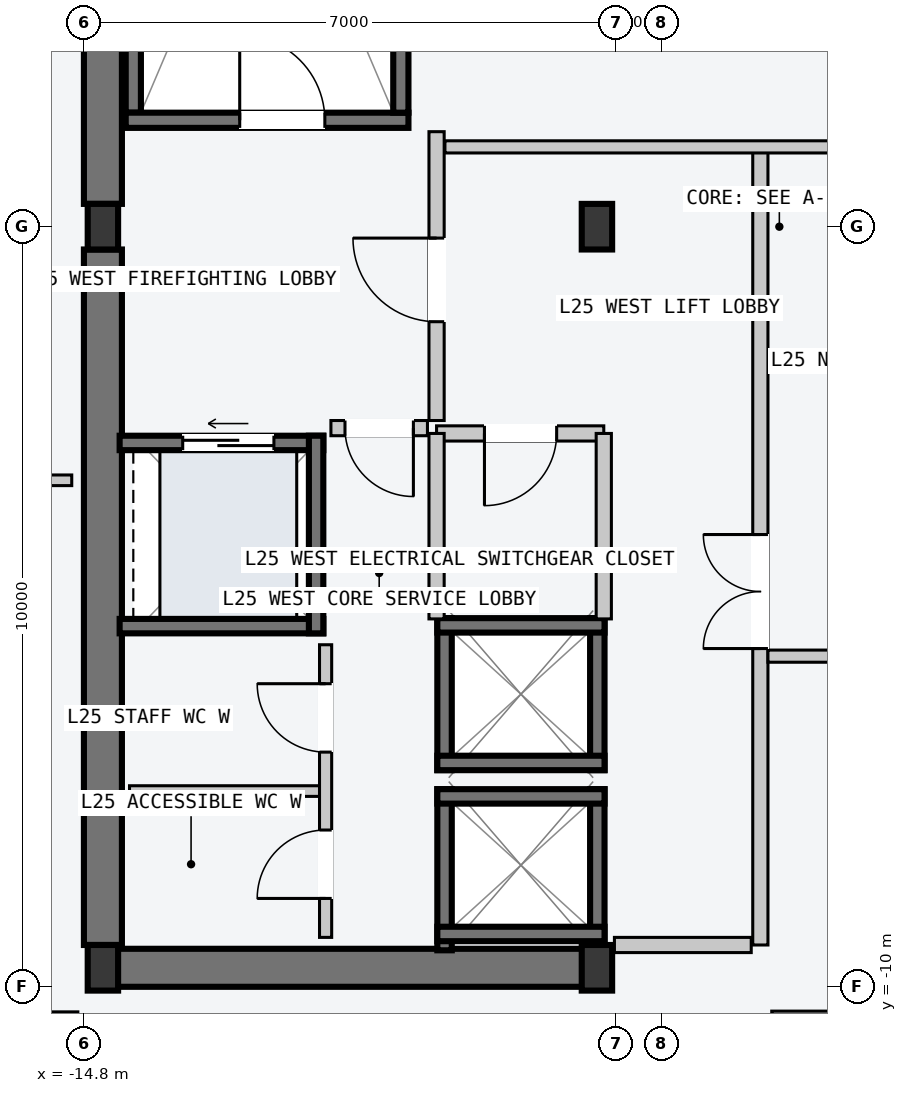
"""IFC4 building model, lengths in metres.
Left out: names, types, materials, properties, quantities, classifications, styles, units other than length and angle.
Written with IfcOpenShell. Run it as: python <this file> out.ifc"""

import sys

from ifc_helpers import new_model, si_unit, direction, frame, frame_2d, origin, origin_2d, place, context, subcontext, project, spatial, rectangle, i_section, extrude, element, fill, save


model = new_model("IFC4")
c1 = context("Model", 3, precision=1e-05, world=origin(), true_north=direction((0.0, 1.0)))
c2 = subcontext(c1, "Body", "Model", "MODEL_VIEW")
j1 = project(units=[si_unit("LENGTHUNIT", "METRE"), si_unit("PLANEANGLEUNIT", "RADIAN")], contexts=[c1])
p1 = place(None, origin())
s1 = spatial("IfcSite", under=j1, at=p1, CompositionType="ELEMENT")
p2 = place(p1, origin())
s2 = spatial("IfcBuilding", under=s1, at=p2, CompositionType="ELEMENT")
p3 = place(p2, frame((0.0, 0.0, 99.0)))
s3 = spatial("IfcBuildingStorey", under=s2, at=p3, CompositionType="ELEMENT", Elevation=99.0)
p4 = place(p3, frame((-14.53, -9.75, -0.2), z_axis=(0.0, 0.0, 1.0), x_axis=(1.0, 0.0, 0.0)))
e1 = element("IfcWall", 1, at=p4, inside=s3, PredefinedType="SHEAR", context=c2, shape_type="SweptSolid", body=[
    extrude(rectangle(XDim=6.46, YDim=0.5, at=frame_2d((3.23, 0.0))), origin(), (0.0, 0.0, 1.0), 3.6),
])
for number, where, z_axis, x_axis in (
    (2, (-14.55, -9.45, -0.2), (0.0, 0.0, 1.0), (0.0, 1.0, 0.0)),
    (3, (-14.55, 0.3, -0.2), (0.0, 0.0, 1.0), (0.0, 1.0, 0.0)),
):
    element("IfcWall", number, at=place(p3, frame(where, z_axis=z_axis, x_axis=x_axis)), inside=s3, PredefinedType="SHEAR", context=c2, shape_type="SweptSolid", body=[
        extrude(rectangle(XDim=9.15, YDim=0.5, at=frame_2d((4.575, 0.0))), origin(), (0.0, 0.0, 1.0), 3.6),
    ])
p5 = place(p3, frame((-14.15, 1.5, -0.2), z_axis=(0.0, 0.0, 1.0), x_axis=(0.0, 1.0, 0.0)))
e4 = element("IfcWall", 4, at=p5, inside=s3, PredefinedType="SOLIDWALL", context=c2, shape_type="SweptSolid", body=[
    extrude(rectangle(XDim=7.8, YDim=0.2, at=frame_2d((3.9, 0.0))), origin(), (0.0, 0.0, 1.0), 3.6),
])
p6 = place(p3, frame((-14.25, 1.4, -0.2), z_axis=(0.0, 0.0, 1.0), x_axis=(1.0, 0.0, 0.0)))
e5 = element("IfcWall", 5, at=p6, inside=s3, PredefinedType="SOLIDWALL", context=c2, shape_type="SweptSolid", body=[
    extrude(rectangle(XDim=3.72, YDim=0.2, at=frame_2d((1.86, 0.0))), origin(), (0.0, 0.0, 1.0), 3.6),
])
p7 = place(p6, frame((1.5, 0.0, 0.2)))
e6 = element("IfcOpeningElement", 6, at=p7, cuts=e5, PredefinedType="OPENING", context=c2, shape_type="SweptSolid", body=[
    extrude(rectangle(XDim=1.12, YDim=2.18, at=frame_2d((0.56, 1.09))), frame((0.0, 0.11, 0.0), z_axis=(0.0, -1.0, 0.0), x_axis=(1.0, 0.0, 0.0)), (0.0, 0.0, 1.0), 0.22),
])
p8 = place(p3, frame((-10.63, 1.5, -0.2), z_axis=(0.0, 0.0, 1.0), x_axis=(0.0, 1.0, 0.0)))
e7 = element("IfcWall", 7, at=p8, inside=s3, PredefinedType="SOLIDWALL", context=c2, shape_type="SweptSolid", body=[
    extrude(rectangle(XDim=7.8, YDim=0.2, at=frame_2d((3.9, 0.0))), origin(), (0.0, 0.0, 1.0), 3.6),
])
for number, where, z_axis, x_axis in (
    (8, (-14.55, -9.75, 0.0), (0.0, 0.0, 1.0), (1.0, 0.0, 0.0)),
    (9, (-14.55, 0.0, 0.0), (0.0, 0.0, 1.0), (1.0, 0.0, 0.0)),
    (10, (-8.05, -9.75, 0.0), (0.0, 0.0, 1.0), (1.0, 0.0, 0.0)),
    (11, (-8.05, 0.0, 0.0), (0.0, 0.0, 1.0), (1.0, 0.0, 0.0)),
):
    element("IfcColumn", number, at=place(p3, frame(where, z_axis=z_axis, x_axis=x_axis)), inside=s3, PredefinedType="COLUMN", context=c2, shape_type="SweptSolid", body=[
        extrude(i_section(OverallWidth=0.4, OverallDepth=0.6, WebThickness=0.022, FlangeThickness=0.036, at=origin_2d()), origin(), (0.0, 0.0, 1.0), 3.6),
    ])
for number, where, z_axis, x_axis in (
    (12, (-8.045, -9.52, -0.2), (0.0, 0.0, 1.0), (0.0, 1.0, 0.0)),
    (13, (-10.055, -9.52, -0.2), (0.0, 0.0, 1.0), (0.0, 1.0, 0.0)),
):
    element("IfcWall", number, at=place(p3, frame(where, z_axis=z_axis, x_axis=x_axis)), inside=s3, PredefinedType="SOLIDWALL", context=c2, shape_type="SweptSolid", body=[
        extrude(rectangle(XDim=2.12, YDim=0.19, at=frame_2d((1.06, 0.0))), origin(), (0.0, 0.0, 1.0), 3.6),
    ])
for number, where, z_axis, x_axis in (
    (14, (-10.15, -7.495, -0.2), (0.0, 0.0, 1.0), (1.0, 0.0, 0.0)),
    (15, (-10.15, -9.305, -0.2), (0.0, 0.0, 1.0), (1.0, 0.0, 0.0)),
):
    element("IfcWall", number, at=place(p3, frame(where, z_axis=z_axis, x_axis=x_axis)), inside=s3, PredefinedType="SOLIDWALL", context=c2, shape_type="SweptSolid", body=[
        extrude(rectangle(XDim=2.2, YDim=0.19, at=frame_2d((1.1, 0.0))), origin(), (0.0, 0.0, 1.0), 3.6),
    ])
for number, where, z_axis, x_axis in (
    (16, (-8.045, -7.15, -0.2), (0.0, 0.0, 1.0), (0.0, 1.0, 0.0)),
    (17, (-10.055, -7.15, -0.2), (0.0, 0.0, 1.0), (0.0, 1.0, 0.0)),
):
    element("IfcWall", number, at=place(p3, frame(where, z_axis=z_axis, x_axis=x_axis)), inside=s3, PredefinedType="SOLIDWALL", context=c2, shape_type="SweptSolid", body=[
        extrude(rectangle(XDim=2.0, YDim=0.19, at=frame_2d((1.0, 0.0))), origin(), (0.0, 0.0, 1.0), 3.6),
    ])
for number, where, z_axis, x_axis in (
    (18, (-10.15, -5.245, -0.2), (0.0, 0.0, 1.0), (1.0, 0.0, 0.0)),
    (19, (-10.15, -7.055, -0.2), (0.0, 0.0, 1.0), (1.0, 0.0, 0.0)),
):
    element("IfcWall", number, at=place(p3, frame(where, z_axis=z_axis, x_axis=x_axis)), inside=s3, PredefinedType="SOLIDWALL", context=c2, shape_type="SweptSolid", body=[
        extrude(rectangle(XDim=2.2, YDim=0.19, at=frame_2d((1.1, 0.0))), origin(), (0.0, 0.0, 1.0), 3.6),
    ])
p9 = place(p3, frame((-14.33, -2.845, -0.2), z_axis=(0.0, 0.0, 1.0), x_axis=(1.0, 0.0, 0.0)))
e20 = element("IfcWall", 20, at=p9, inside=s3, PredefinedType="SOLIDWALL", context=c2, shape_type="SweptSolid", body=[
    extrude(rectangle(XDim=2.68, YDim=0.19, at=frame_2d((1.34, 0.0))), origin(), (0.0, 0.0, 1.0), 3.6),
])
p10 = place(p9, frame((0.83, 0.0, 0.2)))
e21 = element("IfcOpeningElement", 21, at=p10, cuts=e20, PredefinedType="OPENING", context=c2, shape_type="SweptSolid", body=[
    extrude(rectangle(XDim=1.2, YDim=2.2, at=frame_2d((0.6, 1.1))), frame((0.0, 0.105, 0.0), z_axis=(0.0, -1.0, 0.0), x_axis=(1.0, 0.0, 0.0)), (0.0, 0.0, 1.0), 0.21),
])
p11 = place(p3, frame((-14.33, -5.255, -0.2), z_axis=(0.0, 0.0, 1.0), x_axis=(1.0, 0.0, 0.0)))
e22 = element("IfcWall", 22, at=p11, inside=s3, PredefinedType="SOLIDWALL", context=c2, shape_type="SweptSolid", body=[
    extrude(rectangle(XDim=2.68, YDim=0.19, at=frame_2d((1.34, 0.0))), origin(), (0.0, 0.0, 1.0), 3.6),
])
p12 = place(p3, frame((-11.745, -5.35, -0.2), z_axis=(0.0, 0.0, 1.0), x_axis=(0.0, 1.0, 0.0)))
e23 = element("IfcWall", 23, at=p12, inside=s3, PredefinedType="SOLIDWALL", context=c2, shape_type="SweptSolid", body=[
    extrude(rectangle(XDim=2.6, YDim=0.19, at=frame_2d((1.3, 0.0))), origin(), (0.0, 0.0, 1.0), 3.6),
])
p13 = place(p3, frame((-5.9, -9.45, 0.0), z_axis=(0.0, 0.0, 1.0), x_axis=(0.0, 1.0, 0.0)))
e24 = element("IfcWall", 24, at=p13, inside=s3, PredefinedType="PARTITIONING", context=c2, shape_type="SweptSolid", body=[
    extrude(rectangle(XDim=10.5, YDim=0.2, at=frame_2d((5.25, 0.0))), origin(), (0.0, 0.0, 1.0), 3.4),
])
p14 = place(p13, frame((3.9, 0.0, 0.0)))
e25 = element("IfcOpeningElement", 25, at=p14, cuts=e24, PredefinedType="OPENING", context=c2, shape_type="SweptSolid", body=[
    extrude(rectangle(XDim=1.5, YDim=2.2, at=frame_2d((0.75, 1.1))), frame((0.0, 0.11, 0.0), z_axis=(0.0, -1.0, 0.0), x_axis=(1.0, 0.0, 0.0)), (0.0, 0.0, 1.0), 0.22),
])
p15 = place(p3, frame((-6.02, -9.45, 0.0), z_axis=(0.0, 0.0, 1.0), x_axis=(-1.0, 0.0, 0.0)))
e26 = element("IfcWall", 26, at=p15, inside=s3, PredefinedType="PARTITIONING", context=c2, shape_type="SweptSolid", body=[
    extrude(rectangle(XDim=1.8, YDim=0.2, at=frame_2d((0.9, 0.0))), origin(), (0.0, 0.0, 1.0), 3.4),
])
p16 = place(p3, frame((-10.16, -2.55, 0.0), z_axis=(0.0, 0.0, 1.0), x_axis=(0.0, 1.0, 0.0)))
e27 = element("IfcWall", 27, at=p16, inside=s3, PredefinedType="PARTITIONING", context=c2, shape_type="SweptSolid", body=[
    extrude(rectangle(XDim=3.8, YDim=0.2, at=frame_2d((1.9, 0.0))), origin(), (0.0, 0.0, 1.0), 3.4),
])
p17 = place(p16, frame((1.3, 0.0, 0.0)))
e28 = element("IfcOpeningElement", 28, at=p17, cuts=e27, PredefinedType="OPENING", context=c2, shape_type="SweptSolid", body=[
    extrude(rectangle(XDim=1.1, YDim=2.15, at=frame_2d((0.55, 1.075))), frame((0.0, 0.11, 0.0), z_axis=(0.0, -1.0, 0.0), x_axis=(1.0, 0.0, 0.0)), (0.0, 0.0, 1.0), 0.22),
])
p18 = place(p3, frame((-10.28, -2.65, 0.0), z_axis=(0.0, 0.0, 1.0), x_axis=(-1.0, 0.0, 0.0)))
e29 = element("IfcWall", 29, at=p18, inside=s3, PredefinedType="PARTITIONING", context=c2, shape_type="SweptSolid", body=[
    extrude(rectangle(XDim=1.27, YDim=0.2, at=frame_2d((0.635, 0.0))), origin(), (0.0, 0.0, 1.0), 3.4),
])
p19 = place(p18, frame((0.185, 0.0, 0.0)))
e30 = element("IfcOpeningElement", 30, at=p19, cuts=e29, PredefinedType="OPENING", context=c2, shape_type="SweptSolid", body=[
    extrude(rectangle(XDim=0.9, YDim=2.15, at=frame_2d((0.45, 1.075))), frame((0.0, 0.11, 0.0), z_axis=(0.0, -1.0, 0.0), x_axis=(1.0, 0.0, 0.0)), (0.0, 0.0, 1.0), 0.22),
])
p20 = place(p3, frame((-7.96, -2.72, 0.0), z_axis=(0.0, 0.0, 1.0), x_axis=(-1.0, 0.0, 0.0)))
e31 = element("IfcWall", 31, at=p20, inside=s3, PredefinedType="PARTITIONING", context=c2, shape_type="SweptSolid", body=[
    extrude(rectangle(XDim=2.2, YDim=0.2, at=frame_2d((1.1, 0.0))), origin(), (0.0, 0.0, 1.0), 3.4),
])
p21 = place(p20, frame((0.62, 0.0, 0.0)))
e32 = element("IfcOpeningElement", 32, at=p21, cuts=e31, PredefinedType="OPENING", context=c2, shape_type="SweptSolid", body=[
    extrude(rectangle(XDim=0.95, YDim=2.1, at=frame_2d((0.475, 1.05))), frame((0.0, 0.11, 0.0), z_axis=(0.0, -1.0, 0.0), x_axis=(1.0, 0.0, 0.0)), (0.0, 0.0, 1.0), 0.22),
])
for number, where, z_axis, x_axis in (
    (33, (-7.96, -5.16, 0.0), (0.0, 0.0, 1.0), (0.0, 1.0, 0.0)),
    (34, (-10.16, -5.16, 0.0), (0.0, 0.0, 1.0), (0.0, 1.0, 0.0)),
):
    element("IfcWall", number, at=place(p3, frame(where, z_axis=z_axis, x_axis=x_axis)), inside=s3, PredefinedType="PARTITIONING", context=c2, shape_type="SweptSolid", body=[
        extrude(rectangle(XDim=2.44, YDim=0.2, at=frame_2d((1.22, 0.0))), origin(), (0.0, 0.0, 1.0), 3.4),
    ])
p22 = place(p3, frame((-11.7, -7.425, 0.0), z_axis=(0.0, 0.0, 1.0), x_axis=(-1.0, 0.0, 0.0)))
e35 = element("IfcWall", 35, at=p22, inside=s3, PredefinedType="PARTITIONING", context=c2, shape_type="SweptSolid", body=[
    extrude(rectangle(XDim=2.5, YDim=0.14, at=frame_2d((1.25, 0.0))), origin(), (0.0, 0.0, 1.0), 3.4),
])
p23 = place(p3, frame((-11.62, -9.35, 0.0), z_axis=(0.0, 0.0, 1.0), x_axis=(0.0, 1.0, 0.0)))
e36 = element("IfcWall", 36, at=p23, inside=s3, PredefinedType="PARTITIONING", context=c2, shape_type="SweptSolid", body=[
    extrude(rectangle(XDim=3.85, YDim=0.16, at=frame_2d((1.925, 0.0))), origin(), (0.0, 0.0, 1.0), 3.4),
])
p24 = place(p23, frame((0.512, 0.0, 0.0)))
e37 = element("IfcOpeningElement", 37, at=p24, cuts=e36, PredefinedType="OPENING", context=c2, shape_type="SweptSolid", body=[
    extrude(rectangle(XDim=0.9, YDim=2.15, at=frame_2d((0.45, 1.075))), frame((0.0, 0.09, 0.0), z_axis=(0.0, -1.0, 0.0), x_axis=(1.0, 0.0, 0.0)), (0.0, 0.0, 1.0), 0.18),
])
p25 = place(p23, frame((2.438, 0.0, 0.0)))
e38 = element("IfcOpeningElement", 38, at=p25, cuts=e36, PredefinedType="OPENING", context=c2, shape_type="SweptSolid", body=[
    extrude(rectangle(XDim=0.9, YDim=2.15, at=frame_2d((0.45, 1.075))), frame((0.0, 0.09, 0.0), z_axis=(0.0, -1.0, 0.0), x_axis=(1.0, 0.0, 0.0)), (0.0, 0.0, 1.0), 0.18),
])
p26 = place(p3, frame((-10.05, 1.05, 0.0), z_axis=(0.0, 0.0, 1.0), x_axis=(1.0, 0.0, 0.0)))
e39 = element("IfcWall", 39, at=p26, inside=s3, PredefinedType="PARTITIONING", context=c2, shape_type="SweptSolid", body=[
    extrude(rectangle(XDim=6.21, YDim=0.16, at=frame_2d((3.105, 0.0))), origin(), (0.0, 0.0, 1.0), 3.4),
])
p27 = place(p3, frame((-5.8, -5.65, 0.0), z_axis=(0.0, 0.0, 1.0), x_axis=(1.0, 0.0, 0.0)))
e40 = element("IfcWall", 40, at=p27, inside=s3, PredefinedType="PARTITIONING", context=c2, shape_type="SweptSolid", body=[
    extrude(rectangle(XDim=11.6, YDim=0.16, at=frame_2d((5.8, 0.0))), origin(), (0.0, 0.0, 1.0), 3.4),
])
p28 = place(p27, frame((5.1, 0.0, 0.0)))
e41 = element("IfcOpeningElement", 41, at=p28, cuts=e40, PredefinedType="OPENING", context=c2, shape_type="SweptSolid", body=[
    extrude(rectangle(XDim=1.4, YDim=2.2, at=frame_2d((0.7, 1.1))), frame((0.0, 0.09, 0.0), z_axis=(0.0, -1.0, 0.0), x_axis=(1.0, 0.0, 0.0)), (0.0, 0.0, 1.0), 0.18),
])
p29 = place(p3, frame((-5.75, -10.4, 0.0), z_axis=(0.0, 0.0, 1.0), x_axis=(1.0, 0.0, 0.0)))
e42 = element("IfcWall", 42, at=p29, inside=s3, PredefinedType="PARTITIONING", context=c2, shape_type="SweptSolid", body=[
    extrude(rectangle(XDim=11.5, YDim=0.16, at=frame_2d((5.75, 0.0))), origin(), (0.0, 0.0, 1.0), 3.4),
])
p30 = place(p29, frame((5.27, 0.0, 0.0)))
e43 = element("IfcOpeningElement", 43, at=p30, cuts=e42, PredefinedType="OPENING", context=c2, shape_type="SweptSolid", body=[
    extrude(rectangle(XDim=0.96, YDim=2.18, at=frame_2d((0.48, 1.09))), frame((0.0, 0.09, 0.0), z_axis=(0.0, -1.0, 0.0), x_axis=(1.0, 0.0, 0.0)), (0.0, 0.0, 1.0), 0.18),
])
p31 = place(p3, frame((-22.56, -10.4, 0.0), z_axis=(0.0, 0.0, 1.0), x_axis=(1.0, 0.0, 0.0)))
e44 = element("IfcWall", 44, at=p31, inside=s3, PredefinedType="PARTITIONING", context=c2, shape_type="SweptSolid", body=[
    extrude(rectangle(XDim=7.68, YDim=0.14, at=frame_2d((3.84, 0.0))), origin(), (0.0, 0.0, 1.0), 3.4),
])
p32 = place(p31, frame((3.36, 0.0, 0.0)))
e45 = element("IfcOpeningElement", 45, at=p32, cuts=e44, PredefinedType="OPENING", context=c2, shape_type="SweptSolid", body=[
    extrude(rectangle(XDim=0.96, YDim=2.18, at=frame_2d((0.48, 1.09))), frame((0.0, 0.08, 0.0), z_axis=(0.0, -1.0, 0.0), x_axis=(1.0, 0.0, 0.0)), (0.0, 0.0, 1.0), 0.16),
])
p33 = place(p3, frame((-22.56, -3.336, 0.0), z_axis=(0.0, 0.0, 1.0), x_axis=(1.0, 0.0, 0.0)))
e46 = element("IfcWall", 46, at=p33, inside=s3, PredefinedType="PARTITIONING", context=c2, shape_type="SweptSolid", body=[
    extrude(rectangle(XDim=7.6, YDim=0.14, at=frame_2d((3.8, 0.0))), origin(), (0.0, 0.0, 1.0), 3.0),
])
p34 = place(p33, frame((0.9, 0.0, 0.0)))
e47 = element("IfcOpeningElement", 47, at=p34, cuts=e46, PredefinedType="OPENING", context=c2, shape_type="SweptSolid", body=[
    extrude(rectangle(XDim=0.96, YDim=2.18, at=frame_2d((0.48, 1.09))), frame((0.0, 0.08, 0.0), z_axis=(0.0, -1.0, 0.0), x_axis=(1.0, 0.0, 0.0)), (0.0, 0.0, 1.0), 0.16),
])
p35 = place(p7, origin())
e48 = element("IfcDoor", 48, at=p35, inside=s3, OperationType="SINGLE_SWING_LEFT", PredefinedType="DOOR", context=c2, shape_type="SweptSolid", body=[
    extrude(rectangle(XDim=1.12, YDim=2.18, at=frame_2d((0.56, 1.09))), frame((0.0, 0.025, 0.0), z_axis=(0.0, -1.0, 0.0), x_axis=(1.0, 0.0, 0.0)), (0.0, 0.0, 1.0), 0.05),
])
fill(e6, e48)
p36 = place(p10, origin())
e49 = element("IfcDoor", 49, at=p36, inside=s3, OperationType="SLIDING_TO_LEFT", PredefinedType="DOOR", context=c2, shape_type="SweptSolid", body=[
    extrude(rectangle(XDim=1.2, YDim=2.2, at=frame_2d((0.6, 1.1))), frame((0.0, 0.025, 0.0), z_axis=(0.0, -1.0, 0.0), x_axis=(1.0, 0.0, 0.0)), (0.0, 0.0, 1.0), 0.05),
])
fill(e21, e49)
p37 = place(p14, origin())
e50 = element("IfcDoor", 50, at=p37, inside=s3, OperationType="DOUBLE_DOOR_SINGLE_SWING", PredefinedType="DOOR", context=c2, shape_type="SweptSolid", body=[
    extrude(rectangle(XDim=1.5, YDim=2.2, at=frame_2d((0.75, 1.1))), frame((0.0, 0.025, 0.0), z_axis=(0.0, -1.0, 0.0), x_axis=(1.0, 0.0, 0.0)), (0.0, 0.0, 1.0), 0.05),
])
fill(e25, e50)
p38 = place(p17, origin())
e51 = element("IfcDoor", 51, at=p38, inside=s3, OperationType="SINGLE_SWING_RIGHT", PredefinedType="DOOR", context=c2, shape_type="SweptSolid", body=[
    extrude(rectangle(XDim=1.1, YDim=2.15, at=frame_2d((0.55, 1.075))), frame((0.0, 0.025, 0.0), z_axis=(0.0, -1.0, 0.0), x_axis=(1.0, 0.0, 0.0)), (0.0, 0.0, 1.0), 0.05),
])
fill(e28, e51)
p39 = place(p19, origin())
e52 = element("IfcDoor", 52, at=p39, inside=s3, OperationType="SINGLE_SWING_LEFT", PredefinedType="DOOR", context=c2, shape_type="SweptSolid", body=[
    extrude(rectangle(XDim=0.9, YDim=2.15, at=frame_2d((0.45, 1.075))), frame((0.0, 0.025, 0.0), z_axis=(0.0, -1.0, 0.0), x_axis=(1.0, 0.0, 0.0)), (0.0, 0.0, 1.0), 0.05),
])
fill(e30, e52)
p40 = place(p21, origin())
e53 = element("IfcDoor", 53, at=p40, inside=s3, OperationType="SINGLE_SWING_RIGHT", PredefinedType="DOOR", context=c2, shape_type="SweptSolid", body=[
    extrude(rectangle(XDim=0.95, YDim=2.1, at=frame_2d((0.475, 1.05))), frame((0.0, 0.025, 0.0), z_axis=(0.0, -1.0, 0.0), x_axis=(1.0, 0.0, 0.0)), (0.0, 0.0, 1.0), 0.05),
])
fill(e32, e53)
p41 = place(p24, origin())
e54 = element("IfcDoor", 54, at=p41, inside=s3, OperationType="SINGLE_SWING_LEFT", PredefinedType="DOOR", context=c2, shape_type="SweptSolid", body=[
    extrude(rectangle(XDim=0.9, YDim=2.15, at=frame_2d((0.45, 1.075))), frame((0.0, 0.025, 0.0), z_axis=(0.0, -1.0, 0.0), x_axis=(1.0, 0.0, 0.0)), (0.0, 0.0, 1.0), 0.05),
])
fill(e37, e54)
p42 = place(p25, origin())
e55 = element("IfcDoor", 55, at=p42, inside=s3, OperationType="SINGLE_SWING_RIGHT", PredefinedType="DOOR", context=c2, shape_type="SweptSolid", body=[
    extrude(rectangle(XDim=0.9, YDim=2.15, at=frame_2d((0.45, 1.075))), frame((0.0, 0.025, 0.0), z_axis=(0.0, -1.0, 0.0), x_axis=(1.0, 0.0, 0.0)), (0.0, 0.0, 1.0), 0.05),
])
fill(e38, e55)
save(model, sys.argv[1])
